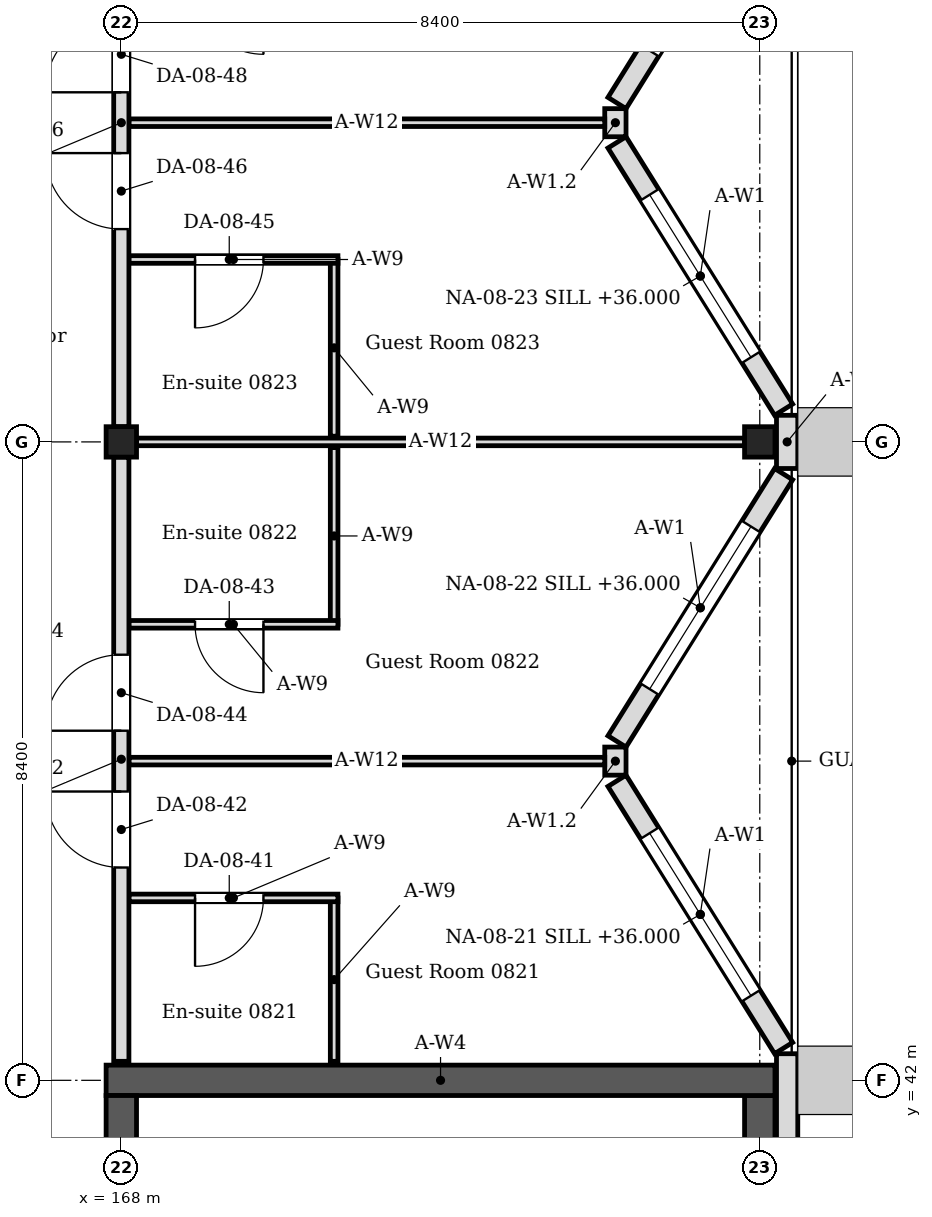
"""IFC4 building model, lengths in metres.
Left out: names, types, materials, properties, quantities, classifications, styles, units other than length and angle.
Written with IfcOpenShell. Run it as: python <this file> out.ifc"""

import sys

from ifc_helpers import new_model, si_unit, direction, frame, frame_2d, origin, origin_2d, place, context, subcontext, project, spatial, rectangle, i_section, extrude, element, fill, save


model = new_model("IFC4")
c1 = context("Model", 3, precision=1e-05, world=origin(), true_north=direction((0.0, 1.0)))
c2 = subcontext(c1, "Body", "Model", "MODEL_VIEW")
j1 = project(units=[si_unit("LENGTHUNIT", "METRE"), si_unit("PLANEANGLEUNIT", "RADIAN")], contexts=[c1])
p1 = place(None, origin())
s1 = spatial("IfcSite", under=j1, at=p1, CompositionType="ELEMENT")
p2 = place(p1, origin())
s2 = spatial("IfcBuilding", under=s1, at=p2, CompositionType="ELEMENT")
p3 = place(p2, frame((0.0, 0.0, 35.4)))
s3 = spatial("IfcBuildingStorey", under=s2, at=p3, CompositionType="ELEMENT", Elevation=35.4)
for number, where, z_axis, x_axis in (
    (1, (168.0, 50.4, 0.0), (0.0, 0.0, 1.0), (1.0, 0.0, 0.0)),
    (2, (176.4, 50.4, 0.0), (0.0, 0.0, 1.0), (1.0, 0.0, 0.0)),
):
    element("IfcColumn", number, at=place(p3, frame(where, z_axis=z_axis, x_axis=x_axis)), inside=s3, PredefinedType="COLUMN", context=c2, shape_type="SweptSolid", body=[
        extrude(i_section(OverallWidth=0.4, OverallDepth=0.4, WebThickness=0.013, FlangeThickness=0.021, FilletRadius=0.022, at=origin_2d()), origin(), (0.0, 0.0, 1.0), 4.2),
    ])
p4 = place(p3, frame((167.8, 42.0, 0.0), z_axis=(0.0, 0.0, 1.0), x_axis=(1.0, 0.0, 0.0)))
e3 = element("IfcWall", 3, at=p4, inside=s3, PredefinedType="SOLIDWALL", context=c2, shape_type="SweptSolid", body=[
    extrude(rectangle(XDim=8.8, YDim=0.4, at=frame_2d((4.4, 0.0))), origin(), (0.0, 0.0, 1.0), 4.05),
])
p5 = place(p3, frame((168.0, 25.4, 0.0), z_axis=(0.0, 0.0, 1.0), x_axis=(0.0, 1.0, 0.0)))
e4 = element("IfcWall", 4, at=p5, inside=s3, PredefinedType="SOLIDWALL", context=c2, shape_type="SweptSolid", body=[
    extrude(rectangle(XDim=16.4, YDim=0.4, at=frame_2d((8.2, 0.0))), origin(), (0.0, 0.0, 1.0), 4.05),
])
p6 = place(p5, frame((1.0, 0.0, 0.0)))
e5 = element("IfcOpeningElement", 5, at=p6, cuts=e4, PredefinedType="OPENING", context=c2, shape_type="SweptSolid", body=[
    extrude(rectangle(XDim=1.0, YDim=2.1, at=frame_2d((0.5, 1.05))), frame((0.0, 0.21, 0.0), z_axis=(0.0, -1.0, 0.0), x_axis=(1.0, 0.0, 0.0)), (0.0, 0.0, 1.0), 0.42),
])
p7 = place(p5, frame((14.4, 0.0, 0.0)))
e6 = element("IfcOpeningElement", 6, at=p7, cuts=e4, PredefinedType="OPENING", context=c2, shape_type="SweptSolid", body=[
    extrude(rectangle(XDim=1.4, YDim=2.1, at=frame_2d((0.7, 1.05))), frame((0.0, 0.21, 0.0), z_axis=(0.0, -1.0, 0.0), x_axis=(1.0, 0.0, 0.0)), (0.0, 0.0, 1.0), 0.42),
])
p8 = place(p3, frame((176.4, 25.4, 0.0), z_axis=(0.0, 0.0, 1.0), x_axis=(0.0, 1.0, 0.0)))
e7 = element("IfcWall", 7, at=p8, inside=s3, PredefinedType="SOLIDWALL", context=c2, shape_type="SweptSolid", body=[
    extrude(rectangle(XDim=16.4, YDim=0.4, at=frame_2d((8.2, 0.0))), origin(), (0.0, 0.0, 1.0), 4.05),
])
p9 = place(p3, frame((176.76, -0.22, 0.0), z_axis=(0.0, 0.0, 1.0), x_axis=(0.0, 1.0, 0.0)))
e8 = element("IfcWall", 8, at=p9, inside=s3, PredefinedType="SOLIDWALL", context=c2, shape_type="SweptSolid", body=[
    extrude(rectangle(XDim=42.57, YDim=0.28, at=frame_2d((21.285, 0.0))), origin(), (0.0, 0.0, 1.0), 4.05),
])
p10 = place(p9, frame((9.88, 0.0, 0.6)))
e9 = element("IfcOpeningElement", 9, at=p10, cuts=e8, PredefinedType="OPENING", context=c2, shape_type="SweptSolid", body=[
    extrude(rectangle(XDim=2.52, YDim=2.4, at=frame_2d((1.26, 1.2))), frame((0.0, 0.15, 0.0), z_axis=(0.0, -1.0, 0.0), x_axis=(1.0, 0.0, 0.0)), (0.0, 0.0, 1.0), 0.3),
])
p11 = place(p9, frame((14.08, 0.0, 0.6)))
e10 = element("IfcOpeningElement", 10, at=p11, cuts=e8, PredefinedType="OPENING", context=c2, shape_type="SweptSolid", body=[
    extrude(rectangle(XDim=2.52, YDim=2.4, at=frame_2d((1.26, 1.2))), frame((0.0, 0.15, 0.0), z_axis=(0.0, -1.0, 0.0), x_axis=(1.0, 0.0, 0.0)), (0.0, 0.0, 1.0), 0.3),
])
p12 = place(p9, frame((17.44, 0.0, 0.6)))
e11 = element("IfcOpeningElement", 11, at=p12, cuts=e8, PredefinedType="OPENING", context=c2, shape_type="SweptSolid", body=[
    extrude(rectangle(XDim=2.52, YDim=2.4, at=frame_2d((1.26, 1.2))), frame((0.0, 0.15, 0.0), z_axis=(0.0, -1.0, 0.0), x_axis=(1.0, 0.0, 0.0)), (0.0, 0.0, 1.0), 0.3),
])
p13 = place(p9, frame((21.64, 0.0, 0.6)))
e12 = element("IfcOpeningElement", 12, at=p13, cuts=e8, PredefinedType="OPENING", context=c2, shape_type="SweptSolid", body=[
    extrude(rectangle(XDim=2.52, YDim=2.4, at=frame_2d((1.26, 1.2))), frame((0.0, 0.15, 0.0), z_axis=(0.0, -1.0, 0.0), x_axis=(1.0, 0.0, 0.0)), (0.0, 0.0, 1.0), 0.3),
])
p14 = place(p3, frame((176.714, 42.424, 0.0), z_axis=(0.0, 0.0, 1.0), x_axis=(-0.529018946142, 0.848610013271, 0.0)))
e13 = element("IfcWall", 13, at=p14, inside=s3, PredefinedType="SOLIDWALL", context=c2, shape_type="SweptSolid", body=[
    extrude(rectangle(XDim=4.144, YDim=0.28, at=frame_2d((2.072, 0.0))), origin(), (0.0, 0.0, 1.0), 4.05),
])
p15 = place(p14, frame((0.812, 0.0, 0.6)))
e14 = element("IfcOpeningElement", 14, at=p15, cuts=e13, PredefinedType="OPENING", context=c2, shape_type="SweptSolid", body=[
    extrude(rectangle(XDim=2.52, YDim=2.4, at=frame_2d((1.26, 1.2))), frame((0.0, 0.15, 0.0), z_axis=(0.0, -1.0, 0.0), x_axis=(1.0, 0.0, 0.0)), (0.0, 0.0, 1.0), 0.3),
])
p16 = place(p3, frame((174.521, 46.459, 0.0), z_axis=(0.0, 0.0, 1.0), x_axis=(0.529018946142, 0.848610013271, 0.0)))
e15 = element("IfcWall", 15, at=p16, inside=s3, PredefinedType="SOLIDWALL", context=c2, shape_type="SweptSolid", body=[
    extrude(rectangle(XDim=4.144, YDim=0.28, at=frame_2d((2.072, 0.0))), origin(), (0.0, 0.0, 1.0), 4.05),
])
p17 = place(p16, frame((0.812, 0.0, 0.6)))
e16 = element("IfcOpeningElement", 16, at=p17, cuts=e15, PredefinedType="OPENING", context=c2, shape_type="SweptSolid", body=[
    extrude(rectangle(XDim=2.52, YDim=2.4, at=frame_2d((1.26, 1.2))), frame((0.0, 0.15, 0.0), z_axis=(0.0, -1.0, 0.0), x_axis=(1.0, 0.0, 0.0)), (0.0, 0.0, 1.0), 0.3),
])
p18 = place(p3, frame((174.5, 46.015, 0.0), z_axis=(0.0, 0.0, 1.0), x_axis=(0.0, 1.0, 0.0)))
e17 = element("IfcWall", 17, at=p18, inside=s3, PredefinedType="SOLIDWALL", context=c2, shape_type="SweptSolid", body=[
    extrude(rectangle(XDim=0.37, YDim=0.28, at=frame_2d((0.185, 0.0))), origin(), (0.0, 0.0, 1.0), 3.604),
])
p19 = place(p3, frame((176.76, 50.05, 0.0), z_axis=(0.0, 0.0, 1.0), x_axis=(0.0, 1.0, 0.0)))
e18 = element("IfcWall", 18, at=p19, inside=s3, PredefinedType="SOLIDWALL", context=c2, shape_type="SweptSolid", body=[
    extrude(rectangle(XDim=0.7, YDim=0.28, at=frame_2d((0.35, 0.0))), origin(), (0.0, 0.0, 1.0), 4.05),
])
p20 = place(p3, frame((176.714, 50.824, 0.0), z_axis=(0.0, 0.0, 1.0), x_axis=(-0.529018946142, 0.848610013271, 0.0)))
e19 = element("IfcWall", 19, at=p20, inside=s3, PredefinedType="SOLIDWALL", context=c2, shape_type="SweptSolid", body=[
    extrude(rectangle(XDim=4.144, YDim=0.28, at=frame_2d((2.072, 0.0))), origin(), (0.0, 0.0, 1.0), 4.05),
])
p21 = place(p20, frame((0.812, 0.0, 0.6)))
e20 = element("IfcOpeningElement", 20, at=p21, cuts=e19, PredefinedType="OPENING", context=c2, shape_type="SweptSolid", body=[
    extrude(rectangle(XDim=2.52, YDim=2.4, at=frame_2d((1.26, 1.2))), frame((0.0, 0.15, 0.0), z_axis=(0.0, -1.0, 0.0), x_axis=(1.0, 0.0, 0.0)), (0.0, 0.0, 1.0), 0.3),
])
p22 = place(p3, frame((174.521, 54.859, 0.0), z_axis=(0.0, 0.0, 1.0), x_axis=(0.528992500338, 0.848626498871, 0.0)))
e21 = element("IfcWall", 21, at=p22, inside=s3, PredefinedType="SOLIDWALL", context=c2, shape_type="SweptSolid", body=[
    extrude(rectangle(XDim=4.145, YDim=0.28, at=frame_2d((2.072, 0.0))), origin(), (0.0, 0.0, 1.0), 4.05),
])
p23 = place(p22, frame((0.812, 0.0, 0.6)))
e22 = element("IfcOpeningElement", 22, at=p23, cuts=e21, PredefinedType="OPENING", context=c2, shape_type="SweptSolid", body=[
    extrude(rectangle(XDim=2.52, YDim=2.4, at=frame_2d((1.26, 1.2))), frame((0.0, 0.15, 0.0), z_axis=(0.0, -1.0, 0.0), x_axis=(1.0, 0.0, 0.0)), (0.0, 0.0, 1.0), 0.3),
])
p24 = place(p3, frame((174.5, 54.415, 0.0), z_axis=(0.0, 0.0, 1.0), x_axis=(0.0, 1.0, 0.0)))
e23 = element("IfcWall", 23, at=p24, inside=s3, PredefinedType="SOLIDWALL", context=c2, shape_type="SweptSolid", body=[
    extrude(rectangle(XDim=0.37, YDim=0.28, at=frame_2d((0.185, 0.0))), origin(), (0.0, 0.0, 1.0), 3.604),
])
p25 = place(p3, frame((170.8, 42.25, 0.0), z_axis=(0.0, 0.0, 1.0), x_axis=(0.0, 1.0, 0.0)))
e24 = element("IfcWall", 24, at=p25, inside=s3, PredefinedType="PARTITIONING", context=c2, shape_type="SweptSolid", body=[
    extrude(rectangle(XDim=2.15, YDim=0.1, at=frame_2d((1.075, 0.0))), origin(), (0.0, 0.0, 1.0), 4.05),
])
p26 = place(p3, frame((170.85, 44.4, 0.0), z_axis=(0.0, 0.0, 1.0), x_axis=(-1.0, 0.0, 0.0)))
e25 = element("IfcWall", 25, at=p26, inside=s3, PredefinedType="PARTITIONING", context=c2, shape_type="SweptSolid", body=[
    extrude(rectangle(XDim=2.75, YDim=0.1, at=frame_2d((1.375, 0.0))), origin(), (0.0, 0.0, 1.0), 4.05),
])
p27 = place(p26, frame((0.98, 0.0, 0.0)))
e26 = element("IfcOpeningElement", 26, at=p27, cuts=e25, PredefinedType="OPENING", context=c2, shape_type="SweptSolid", body=[
    extrude(rectangle(XDim=0.9, YDim=2.1, at=frame_2d((0.45, 1.05))), frame((0.0, 0.06, 0.0), z_axis=(0.0, -1.0, 0.0), x_axis=(1.0, 0.0, 0.0)), (0.0, 0.0, 1.0), 0.12),
])
p28 = place(p3, frame((170.8, 48.0, 0.0), z_axis=(0.0, 0.0, 1.0), x_axis=(0.0, 1.0, 0.0)))
e27 = element("IfcWall", 27, at=p28, inside=s3, PredefinedType="PARTITIONING", context=c2, shape_type="SweptSolid", body=[
    extrude(rectangle(XDim=2.325, YDim=0.1, at=frame_2d((1.163, 0.0))), origin(), (0.0, 0.0, 1.0), 4.05),
])
p29 = place(p3, frame((170.85, 48.0, 0.0), z_axis=(0.0, 0.0, 1.0), x_axis=(-1.0, 0.0, 0.0)))
e28 = element("IfcWall", 28, at=p29, inside=s3, PredefinedType="PARTITIONING", context=c2, shape_type="SweptSolid", body=[
    extrude(rectangle(XDim=2.75, YDim=0.1, at=frame_2d((1.375, 0.0))), origin(), (0.0, 0.0, 1.0), 4.05),
])
p30 = place(p29, frame((0.98, 0.0, 0.0)))
e29 = element("IfcOpeningElement", 29, at=p30, cuts=e28, PredefinedType="OPENING", context=c2, shape_type="SweptSolid", body=[
    extrude(rectangle(XDim=0.9, YDim=2.1, at=frame_2d((0.45, 1.05))), frame((0.0, 0.06, 0.0), z_axis=(0.0, -1.0, 0.0), x_axis=(1.0, 0.0, 0.0)), (0.0, 0.0, 1.0), 0.12),
])
p31 = place(p3, frame((170.8, 50.475, 0.0), z_axis=(0.0, 0.0, 1.0), x_axis=(0.0, 1.0, 0.0)))
e30 = element("IfcWall", 30, at=p31, inside=s3, PredefinedType="PARTITIONING", context=c2, shape_type="SweptSolid", body=[
    extrude(rectangle(XDim=2.325, YDim=0.1, at=frame_2d((1.163, 0.0))), origin(), (0.0, 0.0, 1.0), 4.05),
])
p32 = place(p3, frame((170.85, 52.8, 0.0), z_axis=(0.0, 0.0, 1.0), x_axis=(-1.0, 0.0, 0.0)))
e31 = element("IfcWall", 31, at=p32, inside=s3, PredefinedType="PARTITIONING", context=c2, shape_type="SweptSolid", body=[
    extrude(rectangle(XDim=2.75, YDim=0.1, at=frame_2d((1.375, 0.0))), origin(), (0.0, 0.0, 1.0), 4.05),
])
p33 = place(p32, frame((0.98, 0.0, 0.0)))
e32 = element("IfcOpeningElement", 32, at=p33, cuts=e31, PredefinedType="OPENING", context=c2, shape_type="SweptSolid", body=[
    extrude(rectangle(XDim=0.9, YDim=2.1, at=frame_2d((0.45, 1.05))), frame((0.0, 0.06, 0.0), z_axis=(0.0, -1.0, 0.0), x_axis=(1.0, 0.0, 0.0)), (0.0, 0.0, 1.0), 0.12),
])
p34 = place(p3, frame((168.2, 50.4, 0.0), z_axis=(0.0, 0.0, 1.0), x_axis=(1.0, 0.0, 0.0)))
e33 = element("IfcWall", 33, at=p34, inside=s3, PredefinedType="PARTITIONING", context=c2, shape_type="SweptSolid", body=[
    extrude(rectangle(XDim=8.0, YDim=0.1, at=frame_2d((4.0, 0.0))), origin(), (0.0, 0.0, 1.0), 3.604),
])
for number, where, z_axis, x_axis in (
    (34, (168.1, 46.2, 0.0), (0.0, 0.0, 1.0), (1.0, 0.0, 0.0)),
    (35, (168.1, 54.6, 0.0), (0.0, 0.0, 1.0), (1.0, 0.0, 0.0)),
):
    element("IfcWall", number, at=place(p3, frame(where, z_axis=z_axis, x_axis=x_axis)), inside=s3, PredefinedType="PARTITIONING", context=c2, shape_type="SweptSolid", body=[
        extrude(rectangle(XDim=6.26, YDim=0.1, at=frame_2d((3.13, 0.0))), origin(), (0.0, 0.0, 1.0), 3.604),
    ])
p35 = place(p3, frame((168.0, 42.25, 0.0), z_axis=(0.0, 0.0, 1.0), x_axis=(0.0, 1.0, 0.0)))
e36 = element("IfcWall", 36, at=p35, inside=s3, PredefinedType="PARTITIONING", context=c2, shape_type="SweptSolid", body=[
    extrude(rectangle(XDim=7.95, YDim=0.2, at=frame_2d((3.975, 0.0))), origin(), (0.0, 0.0, 1.0), 3.45),
])
p36 = place(p35, frame((2.55, 0.0, 0.0)))
e37 = element("IfcOpeningElement", 37, at=p36, cuts=e36, PredefinedType="OPENING", context=c2, shape_type="SweptSolid", body=[
    extrude(rectangle(XDim=1.0, YDim=2.4, at=frame_2d((0.5, 1.2))), frame((0.0, 0.11, 0.0), z_axis=(0.0, -1.0, 0.0), x_axis=(1.0, 0.0, 0.0)), (0.0, 0.0, 1.0), 0.22),
])
p37 = place(p35, frame((4.35, 0.0, 0.0)))
e38 = element("IfcOpeningElement", 38, at=p37, cuts=e36, PredefinedType="OPENING", context=c2, shape_type="SweptSolid", body=[
    extrude(rectangle(XDim=1.0, YDim=2.4, at=frame_2d((0.5, 1.2))), frame((0.0, 0.11, 0.0), z_axis=(0.0, -1.0, 0.0), x_axis=(1.0, 0.0, 0.0)), (0.0, 0.0, 1.0), 0.22),
])
p38 = place(p3, frame((168.0, 50.6, 0.0), z_axis=(0.0, 0.0, 1.0), x_axis=(0.0, 1.0, 0.0)))
e39 = element("IfcWall", 39, at=p38, inside=s3, PredefinedType="PARTITIONING", context=c2, shape_type="SweptSolid", body=[
    extrude(rectangle(XDim=8.0, YDim=0.2, at=frame_2d((4.0, 0.0))), origin(), (0.0, 0.0, 1.0), 3.45),
])
p39 = place(p38, frame((2.6, 0.0, 0.0)))
e40 = element("IfcOpeningElement", 40, at=p39, cuts=e39, PredefinedType="OPENING", context=c2, shape_type="SweptSolid", body=[
    extrude(rectangle(XDim=1.0, YDim=2.4, at=frame_2d((0.5, 1.2))), frame((0.0, 0.11, 0.0), z_axis=(0.0, -1.0, 0.0), x_axis=(1.0, 0.0, 0.0)), (0.0, 0.0, 1.0), 0.22),
])
p40 = place(p38, frame((4.4, 0.0, 0.0)))
e41 = element("IfcOpeningElement", 41, at=p40, cuts=e39, PredefinedType="OPENING", context=c2, shape_type="SweptSolid", body=[
    extrude(rectangle(XDim=1.0, YDim=2.4, at=frame_2d((0.5, 1.2))), frame((0.0, 0.11, 0.0), z_axis=(0.0, -1.0, 0.0), x_axis=(1.0, 0.0, 0.0)), (0.0, 0.0, 1.0), 0.22),
])
p41 = place(p15, origin())
e42 = element("IfcWindow", 42, at=p41, inside=s3, PartitioningType="SINGLE_PANEL", PredefinedType="WINDOW", context=c2, shape_type="SweptSolid", body=[
    extrude(rectangle(XDim=2.52, YDim=2.4, at=frame_2d((1.26, 1.2))), frame((0.0, 0.03, 0.0), z_axis=(0.0, -1.0, 0.0), x_axis=(1.0, 0.0, 0.0)), (0.0, 0.0, 1.0), 0.06),
])
fill(e14, e42)
p42 = place(p17, origin())
e43 = element("IfcWindow", 43, at=p42, inside=s3, PartitioningType="SINGLE_PANEL", PredefinedType="WINDOW", context=c2, shape_type="SweptSolid", body=[
    extrude(rectangle(XDim=2.52, YDim=2.4, at=frame_2d((1.26, 1.2))), frame((0.0, 0.03, 0.0), z_axis=(0.0, -1.0, 0.0), x_axis=(1.0, 0.0, 0.0)), (0.0, 0.0, 1.0), 0.06),
])
fill(e16, e43)
p43 = place(p21, origin())
e44 = element("IfcWindow", 44, at=p43, inside=s3, PartitioningType="SINGLE_PANEL", PredefinedType="WINDOW", context=c2, shape_type="SweptSolid", body=[
    extrude(rectangle(XDim=2.52, YDim=2.4, at=frame_2d((1.26, 1.2))), frame((0.0, 0.03, 0.0), z_axis=(0.0, -1.0, 0.0), x_axis=(1.0, 0.0, 0.0)), (0.0, 0.0, 1.0), 0.06),
])
fill(e20, e44)
p44 = place(p27, origin())
e45 = element("IfcDoor", 45, at=p44, inside=s3, OperationType="SINGLE_SWING_RIGHT", PredefinedType="DOOR", context=c2, shape_type="SweptSolid", body=[
    extrude(rectangle(XDim=0.9, YDim=2.1, at=frame_2d((0.45, 1.05))), frame((0.0, 0.025, 0.0), z_axis=(0.0, -1.0, 0.0), x_axis=(1.0, 0.0, 0.0)), (0.0, 0.0, 1.0), 0.05),
])
fill(e26, e45)
p45 = place(p36, origin())
e46 = element("IfcDoor", 46, at=p45, inside=s3, OperationType="SINGLE_SWING_RIGHT", PredefinedType="DOOR", context=c2, shape_type="SweptSolid", body=[
    extrude(rectangle(XDim=1.0, YDim=2.4, at=frame_2d((0.5, 1.2))), frame((0.0, 0.025, 0.0), z_axis=(0.0, -1.0, 0.0), x_axis=(1.0, 0.0, 0.0)), (0.0, 0.0, 1.0), 0.05),
])
fill(e37, e46)
p46 = place(p30, origin())
e47 = element("IfcDoor", 47, at=p46, inside=s3, OperationType="SINGLE_SWING_LEFT", PredefinedType="DOOR", context=c2, shape_type="SweptSolid", body=[
    extrude(rectangle(XDim=0.9, YDim=2.1, at=frame_2d((0.45, 1.05))), frame((0.0, 0.025, 0.0), z_axis=(0.0, -1.0, 0.0), x_axis=(1.0, 0.0, 0.0)), (0.0, 0.0, 1.0), 0.05),
])
fill(e29, e47)
p47 = place(p37, origin())
e48 = element("IfcDoor", 48, at=p47, inside=s3, OperationType="SINGLE_SWING_LEFT", PredefinedType="DOOR", context=c2, shape_type="SweptSolid", body=[
    extrude(rectangle(XDim=1.0, YDim=2.4, at=frame_2d((0.5, 1.2))), frame((0.0, 0.025, 0.0), z_axis=(0.0, -1.0, 0.0), x_axis=(1.0, 0.0, 0.0)), (0.0, 0.0, 1.0), 0.05),
])
fill(e38, e48)
p48 = place(p33, origin())
e49 = element("IfcDoor", 49, at=p48, inside=s3, OperationType="SINGLE_SWING_RIGHT", PredefinedType="DOOR", context=c2, shape_type="SweptSolid", body=[
    extrude(rectangle(XDim=0.9, YDim=2.1, at=frame_2d((0.45, 1.05))), frame((0.0, 0.025, 0.0), z_axis=(0.0, -1.0, 0.0), x_axis=(1.0, 0.0, 0.0)), (0.0, 0.0, 1.0), 0.05),
])
fill(e32, e49)
p49 = place(p39, origin())
e50 = element("IfcDoor", 50, at=p49, inside=s3, OperationType="SINGLE_SWING_RIGHT", PredefinedType="DOOR", context=c2, shape_type="SweptSolid", body=[
    extrude(rectangle(XDim=1.0, YDim=2.4, at=frame_2d((0.5, 1.2))), frame((0.0, 0.025, 0.0), z_axis=(0.0, -1.0, 0.0), x_axis=(1.0, 0.0, 0.0)), (0.0, 0.0, 1.0), 0.05),
])
fill(e40, e50)
p50 = place(p40, origin())
e51 = element("IfcDoor", 51, at=p50, inside=s3, OperationType="SINGLE_SWING_LEFT", PredefinedType="DOOR", context=c2, shape_type="SweptSolid", body=[
    extrude(rectangle(XDim=1.0, YDim=2.4, at=frame_2d((0.5, 1.2))), frame((0.0, 0.025, 0.0), z_axis=(0.0, -1.0, 0.0), x_axis=(1.0, 0.0, 0.0)), (0.0, 0.0, 1.0), 0.05),
])
fill(e41, e51)
save(model, sys.argv[1])
